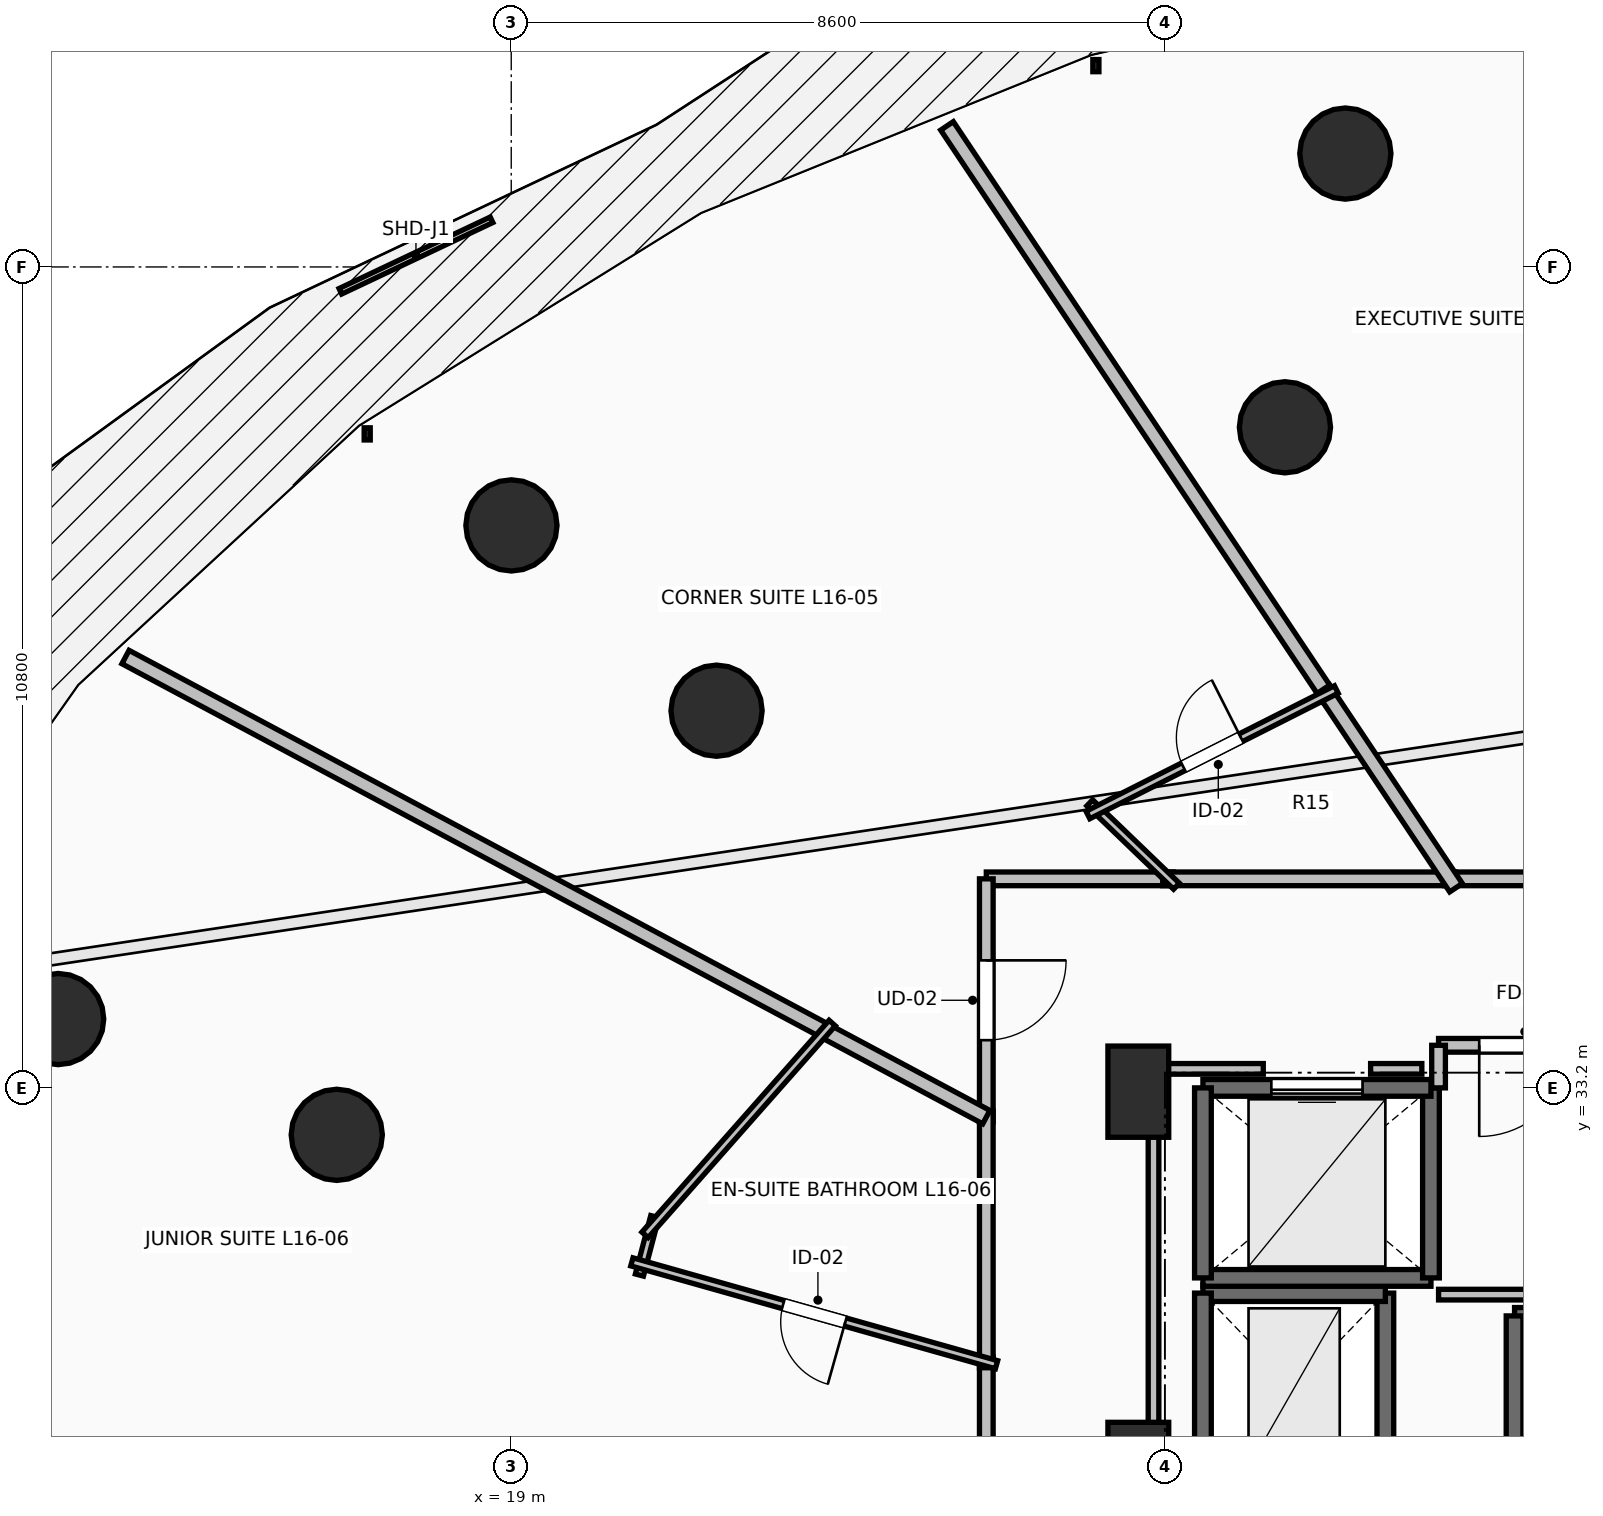
"""IFC4 building model, lengths in metres.
Left out: names, types, materials, properties, quantities, classifications, styles, units other than length and angle.
Written with IfcOpenShell. Run it as: python <this file> out.ifc"""

import sys

from ifc_helpers import new_model, si_unit, direction, frame, frame_2d, origin, origin_2d, place, context, subcontext, project, spatial, rectangle, circle, extrude, element, fill, save


model = new_model("IFC4")
c1 = context("Model", 3, precision=1e-05, world=origin(), true_north=direction((0.0, 1.0)))
c2 = subcontext(c1, "Body", "Model", "MODEL_VIEW")
j1 = project(units=[si_unit("LENGTHUNIT", "METRE"), si_unit("PLANEANGLEUNIT", "RADIAN")], contexts=[c1])
p1 = place(None, origin())
s1 = spatial("IfcSite", under=j1, at=p1, CompositionType="ELEMENT")
p2 = place(p1, origin())
s2 = spatial("IfcBuilding", under=s1, at=p2, CompositionType="ELEMENT")
p3 = place(p2, frame((0.0, 0.0, 62.5)))
s3 = spatial("IfcBuildingStorey", under=s2, at=p3, CompositionType="ELEMENT", Elevation=62.5)
for number, where, z_axis, x_axis in (
    (1, (29.179, 41.891, 0.0), (0.0, 0.0, 1.0), (-0.383, 0.924, 0.0)),
    (2, (21.701, 38.162, 0.0), (0.0, 0.0, 1.0), (-0.707, 0.707, 0.0)),
    (3, (16.705, 32.582, 0.0), (0.0, 0.0, 1.0), (-0.924, 0.383, 0.0)),
    (4, (29.974, 45.492, 0.0), (0.0, 0.0, 1.0), (-0.383, 0.924, 0.0)),
    (5, (19.003, 40.6, 0.0), (0.0, 0.0, 1.0), (-0.707, 0.707, 0.0)),
    (6, (13.039, 34.105, 0.0), (0.0, 0.0, 1.0), (-0.924, 0.383, 0.0)),
):
    element("IfcColumn", number, at=place(p3, frame(where, z_axis=z_axis, x_axis=x_axis)), inside=s3, PredefinedType="COLUMN", context=c2, shape_type="SweptSolid", body=[
        extrude(circle(Radius=0.6, at=origin_2d()), origin(), (0.0, 0.0, 1.0), 3.5),
    ])
for number, where, z_axis, x_axis in (
    (7, (27.25, 28.2, 0.0), (0.0, 0.0, 1.0), (1.0, 0.0, 0.0)),
    (8, (27.25, 33.15, 0.0), (0.0, 0.0, 1.0), (1.0, 0.0, 0.0)),
):
    element("IfcColumn", number, at=place(p3, frame(where, z_axis=z_axis, x_axis=x_axis)), inside=s3, PredefinedType="PILASTER", context=c2, shape_type="SweptSolid", body=[
        extrude(rectangle(XDim=0.8, YDim=1.2, at=origin_2d()), origin(), (0.0, 0.0, 1.0), 3.5),
    ])
p4 = place(p3, frame((34.2, 30.2, 0.0), z_axis=(0.0, 0.0, 1.0), x_axis=(-1.0, 0.0, 0.0)))
e9 = element("IfcWall", 9, at=p4, inside=s3, PredefinedType="SOLIDWALL", context=c2, shape_type="SweptSolid", body=[
    extrude(rectangle(XDim=2.0, YDim=0.22, at=frame_2d((1.0, 0.0))), origin(), (0.0, 0.0, 1.0), 3.24),
])
p5 = place(p3, frame((32.2, 30.2, 0.0), z_axis=(0.0, 0.0, 1.0), x_axis=(0.0, -1.0, 0.0)))
e10 = element("IfcWall", 10, at=p5, inside=s3, PredefinedType="SOLIDWALL", context=c2, shape_type="SweptSolid", body=[
    extrude(rectangle(XDim=2.4, YDim=0.22, at=frame_2d((1.2, 0.0))), origin(), (0.0, 0.0, 1.0), 3.24),
])
p6 = place(p3, frame((30.5, 28.0, 0.0), z_axis=(0.0, 0.0, 1.0), x_axis=(0.0, 1.0, 0.0)))
e11 = element("IfcWall", 11, at=p6, inside=s3, PredefinedType="SHEAR", context=c2, shape_type="SweptSolid", body=[
    extrude(rectangle(XDim=2.5, YDim=0.22, at=frame_2d((1.25, 0.0))), origin(), (0.0, 0.0, 1.0), 3.24),
])
p7 = place(p3, frame((30.5, 30.5, 0.0), z_axis=(0.0, 0.0, 1.0), x_axis=(-1.0, 0.0, 0.0)))
e12 = element("IfcWall", 12, at=p7, inside=s3, PredefinedType="SHEAR", context=c2, shape_type="SweptSolid", body=[
    extrude(rectangle(XDim=2.4, YDim=0.22, at=frame_2d((1.2, 0.0))), origin(), (0.0, 0.0, 1.0), 3.24),
])
p8 = place(p3, frame((28.1, 30.5, 0.0), z_axis=(0.0, 0.0, 1.0), x_axis=(0.0, -1.0, 0.0)))
e13 = element("IfcWall", 13, at=p8, inside=s3, PredefinedType="SHEAR", context=c2, shape_type="SweptSolid", body=[
    extrude(rectangle(XDim=2.5, YDim=0.22, at=frame_2d((1.25, 0.0))), origin(), (0.0, 0.0, 1.0), 3.24),
])
p9 = place(p3, frame((28.1, 30.7, 0.0), z_axis=(0.0, 0.0, 1.0), x_axis=(1.0, 0.0, 0.0)))
e14 = element("IfcWall", 14, at=p9, inside=s3, PredefinedType="SOLIDWALL", context=c2, shape_type="SweptSolid", body=[
    extrude(rectangle(XDim=3.0, YDim=0.22, at=frame_2d((1.5, 0.0))), origin(), (0.0, 0.0, 1.0), 3.24),
])
p10 = place(p3, frame((31.1, 30.7, 0.0), z_axis=(0.0, 0.0, 1.0), x_axis=(0.0, 1.0, 0.0)))
e15 = element("IfcWall", 15, at=p10, inside=s3, PredefinedType="SOLIDWALL", context=c2, shape_type="SweptSolid", body=[
    extrude(rectangle(XDim=2.5, YDim=0.22, at=frame_2d((1.25, 0.0))), origin(), (0.0, 0.0, 1.0), 3.24),
])
p11 = place(p3, frame((31.1, 33.2, 0.0), z_axis=(0.0, 0.0, 1.0), x_axis=(-1.0, 0.0, 0.0)))
e16 = element("IfcWall", 16, at=p11, inside=s3, PredefinedType="SOLIDWALL", context=c2, shape_type="SweptSolid", body=[
    extrude(rectangle(XDim=3.0, YDim=0.22, at=frame_2d((1.5, 0.0))), origin(), (0.0, 0.0, 1.0), 3.24),
])
p12 = place(p11, frame((0.9, 0.0, 0.0)))
e17 = element("IfcOpeningElement", 17, at=p12, cuts=e16, PredefinedType="OPENING", context=c2, shape_type="SweptSolid", body=[
    extrude(rectangle(XDim=1.2, YDim=2.2, at=frame_2d((0.6, 1.1))), frame((0.0, 0.125, 0.0), z_axis=(0.0, -1.0, 0.0), x_axis=(1.0, 0.0, 0.0)), (0.0, 0.0, 1.0), 0.25),
])
p13 = place(p3, frame((28.1, 33.2, 0.0), z_axis=(0.0, 0.0, 1.0), x_axis=(0.0, -1.0, 0.0)))
e18 = element("IfcWall", 18, at=p13, inside=s3, PredefinedType="SOLIDWALL", context=c2, shape_type="SweptSolid", body=[
    extrude(rectangle(XDim=2.5, YDim=0.22, at=frame_2d((1.25, 0.0))), origin(), (0.0, 0.0, 1.0), 3.24),
])
p14 = place(p3, frame((33.47, 33.76, 0.0), z_axis=(0.0, 0.0, 1.0), x_axis=(-1.0, 0.0, 0.0)))
e19 = element("IfcWall", 19, at=p14, inside=s3, PredefinedType="PARTITIONING", context=c2, shape_type="SweptSolid", body=[
    extrude(rectangle(XDim=2.27, YDim=0.18, at=frame_2d((1.135, 0.0))), origin(), (0.0, 0.0, 1.0), 3.24),
])
p15 = place(p14, frame((0.535, 0.0, 0.0)))
e20 = element("IfcOpeningElement", 20, at=p15, cuts=e19, PredefinedType="OPENING", context=c2, shape_type="SweptSolid", body=[
    extrude(rectangle(XDim=1.2, YDim=2.15, at=frame_2d((0.6, 1.075))), frame((0.0, 0.105, 0.0), z_axis=(0.0, -1.0, 0.0), x_axis=(1.0, 0.0, 0.0)), (0.0, 0.0, 1.0), 0.21),
])
p16 = place(p3, frame((31.2, 33.76, 0.0), z_axis=(0.0, 0.0, 1.0), x_axis=(0.0, -1.0, 0.0)))
e21 = element("IfcWall", 21, at=p16, inside=s3, PredefinedType="PARTITIONING", context=c2, shape_type="SweptSolid", body=[
    extrude(rectangle(XDim=0.56, YDim=0.18, at=frame_2d((0.28, 0.0))), origin(), (0.0, 0.0, 1.0), 3.24),
])
p17 = place(p3, frame((34.827, 35.95, 0.0), z_axis=(0.0, 0.0, 1.0), x_axis=(-1.0, 0.0, 0.0)))
e22 = element("IfcWall", 22, at=p17, inside=s3, PredefinedType="PARTITIONING", context=c2, shape_type="SweptSolid", body=[
    extrude(rectangle(XDim=3.547, YDim=0.18, at=frame_2d((1.773, 0.0))), origin(), (0.0, 0.0, 1.0), 3.24),
])
p18 = place(p17, frame((1.249, 0.0, 0.0)))
e23 = element("IfcOpeningElement", 23, at=p18, cuts=e22, PredefinedType="OPENING", context=c2, shape_type="SweptSolid", body=[
    extrude(rectangle(XDim=1.05, YDim=2.2, at=frame_2d((0.525, 1.1))), frame((0.0, 0.105, 0.0), z_axis=(0.0, -1.0, 0.0), x_axis=(1.0, 0.0, 0.0)), (0.0, 0.0, 1.0), 0.21),
])
p19 = place(p3, frame((27.711, 35.95, 0.0), z_axis=(0.0, 0.0, 1.0), x_axis=(-1.0, 0.0, 0.0)))
e24 = element("IfcWall", 24, at=p19, inside=s3, PredefinedType="PARTITIONING", context=c2, shape_type="SweptSolid", body=[
    extrude(rectangle(XDim=2.461, YDim=0.18, at=frame_2d((1.23, 0.0))), origin(), (0.0, 0.0, 1.0), 2.432),
])
p20 = place(p3, frame((25.25, 35.95, 0.0), z_axis=(0.0, 0.0, 1.0), x_axis=(0.0, -1.0, 0.0)))
e25 = element("IfcWall", 25, at=p20, inside=s3, PredefinedType="PARTITIONING", context=c2, shape_type="SweptSolid", body=[
    extrude(rectangle(XDim=3.195, YDim=0.18, at=frame_2d((1.598, 0.0))), origin(), (0.0, 0.0, 1.0), 2.432),
])
p21 = place(p20, frame((1.073, 0.0, 0.0)))
e26 = element("IfcOpeningElement", 26, at=p21, cuts=e25, PredefinedType="OPENING", context=c2, shape_type="SweptSolid", body=[
    extrude(rectangle(XDim=1.05, YDim=2.2, at=frame_2d((0.525, 1.1))), frame((0.0, 0.105, 0.0), z_axis=(0.0, -1.0, 0.0), x_axis=(1.0, 0.0, 0.0)), (0.0, 0.0, 1.0), 0.21),
])
p22 = place(p3, frame((31.42, 35.95, 0.0), z_axis=(0.0, 0.0, 1.0), x_axis=(-1.0, 0.0, 0.0)))
e27 = element("IfcWall", 27, at=p22, inside=s3, PredefinedType="PARTITIONING", context=c2, shape_type="SweptSolid", body=[
    extrude(rectangle(XDim=3.849, YDim=0.18, at=frame_2d((1.924, 0.0))), origin(), (0.0, 0.0, 1.0), 2.432),
])
p23 = place(p3, frame((25.25, 29.658, 0.0), z_axis=(0.0, 0.0, 1.0), x_axis=(0.0, -1.0, 0.0)))
e28 = element("IfcWall", 28, at=p23, inside=s3, PredefinedType="PARTITIONING", context=c2, shape_type="SweptSolid", body=[
    extrude(rectangle(XDim=3.718, YDim=0.18, at=frame_2d((1.859, 0.0))), origin(), (0.0, 0.0, 1.0), 2.432),
])
p24 = place(p23, frame((1.334, 0.0, 0.0)))
e29 = element("IfcOpeningElement", 29, at=p24, cuts=e28, PredefinedType="OPENING", context=c2, shape_type="SweptSolid", body=[
    extrude(rectangle(XDim=1.05, YDim=2.2, at=frame_2d((0.525, 1.1))), frame((0.0, 0.105, 0.0), z_axis=(0.0, -1.0, 0.0), x_axis=(1.0, 0.0, 0.0)), (0.0, 0.0, 1.0), 0.21),
])
p25 = place(p3, frame((25.25, 32.895, 0.0), z_axis=(0.0, 0.0, 1.0), x_axis=(0.0, -1.0, 0.0)))
e30 = element("IfcWall", 30, at=p25, inside=s3, PredefinedType="PARTITIONING", context=c2, shape_type="SweptSolid", body=[
    extrude(rectangle(XDim=3.377, YDim=0.18, at=frame_2d((1.688, 0.0))), origin(), (0.0, 0.0, 1.0), 3.24),
])
p26 = place(p3, frame((24.733, 45.856, 0.0), z_axis=(0.0, 0.0, 1.0), x_axis=(0.555564858458, -0.831473203444, 0.0)))
e31 = element("IfcWall", 31, at=p26, inside=s3, PredefinedType="PARTITIONING", context=c2, shape_type="SweptSolid", body=[
    extrude(rectangle(XDim=9.054, YDim=0.2, at=frame_2d((4.527, 0.0))), origin(), (0.0, 0.0, 1.0), 2.432),
])
p27 = place(p3, frame((29.685, 38.444, 0.0), z_axis=(0.0, 0.0, 1.0), x_axis=(0.555596981897, -0.831451738652, 0.0)))
e32 = element("IfcWall", 32, at=p27, inside=s3, PredefinedType="PARTITIONING", context=c2, shape_type="SweptSolid", body=[
    extrude(rectangle(XDim=3.14, YDim=0.2, at=frame_2d((1.57, 0.0))), origin(), (0.0, 0.0, 1.0), 2.432),
])
p28 = place(p3, frame((27.752, 35.853, 0.0), z_axis=(0.0, 0.0, 1.0), x_axis=(-0.720853814296, 0.693087136236, 0.0)))
e33 = element("IfcWall", 33, at=p28, inside=s3, PredefinedType="PARTITIONING", context=c2, shape_type="SweptSolid", body=[
    extrude(rectangle(XDim=1.583, YDim=0.11, at=frame_2d((0.792, 0.0))), origin(), (0.0, 0.0, 1.0), 2.432),
])
p29 = place(p3, frame((26.587, 36.79, 0.0), z_axis=(0.0, 0.0, 1.0), x_axis=(0.892525573298, 0.450996786029, 0.0)))
e34 = element("IfcWall", 34, at=p29, inside=s3, PredefinedType="PARTITIONING", context=c2, shape_type="SweptSolid", body=[
    extrude(rectangle(XDim=3.662, YDim=0.11, at=frame_2d((1.831, 0.0))), origin(), (0.0, 0.0, 1.0), 2.432),
])
p30 = place(p29, frame((1.406, 0.0, 0.0)))
e35 = element("IfcOpeningElement", 35, at=p30, cuts=e34, PredefinedType="OPENING", context=c2, shape_type="SweptSolid", body=[
    extrude(rectangle(XDim=0.85, YDim=2.1, at=frame_2d((0.425, 1.05))), frame((0.0, 0.07, 0.0), z_axis=(0.0, -1.0, 0.0), x_axis=(1.0, 0.0, 0.0)), (0.0, 0.0, 1.0), 0.14),
])
p31 = place(p3, frame((13.925, 38.868, 0.0), z_axis=(0.0, 0.0, 1.0), x_axis=(0.881932077496, -0.471376506292, 0.0)))
e36 = element("IfcWall", 36, at=p31, inside=s3, PredefinedType="PARTITIONING", context=c2, shape_type="SweptSolid", body=[
    extrude(rectangle(XDim=12.841, YDim=0.2, at=frame_2d((6.42, 0.0))), origin(), (0.0, 0.0, 1.0), 2.624),
])
p32 = place(p3, frame((20.686, 30.738, 0.0), z_axis=(0.0, 0.0, 1.0), x_axis=(0.254583995409, 0.967050665313, 0.0)))
e37 = element("IfcWall", 37, at=p32, inside=s3, PredefinedType="PARTITIONING", context=c2, shape_type="SweptSolid", body=[
    extrude(rectangle(XDim=0.795, YDim=0.11, at=frame_2d((0.397, 0.0))), origin(), (0.0, 0.0, 1.0), 2.432),
])
p33 = place(p3, frame((20.76, 31.266, 0.0), z_axis=(0.0, 0.0, 1.0), x_axis=(0.662136072578, 0.74938362765, 0.0)))
e38 = element("IfcWall", 38, at=p33, inside=s3, PredefinedType="PARTITIONING", context=c2, shape_type="SweptSolid", body=[
    extrude(rectangle(XDim=3.719, YDim=0.11, at=frame_2d((1.859, 0.0))), origin(), (0.0, 0.0, 1.0), 3.24),
])
p34 = place(p3, frame((25.385, 29.558, 0.0), z_axis=(0.0, 0.0, 1.0), x_axis=(-0.962466408657, 0.271400833098, 0.0)))
e39 = element("IfcWall", 39, at=p34, inside=s3, PredefinedType="PARTITIONING", context=c2, shape_type="SweptSolid", body=[
    extrude(rectangle(XDim=4.984, YDim=0.11, at=frame_2d((2.492, 0.0))), origin(), (0.0, 0.0, 1.0), 2.432),
])
p35 = place(p34, frame((2.067, 0.0, 0.0)))
e40 = element("IfcOpeningElement", 40, at=p35, cuts=e39, PredefinedType="OPENING", context=c2, shape_type="SweptSolid", body=[
    extrude(rectangle(XDim=0.85, YDim=2.1, at=frame_2d((0.425, 1.05))), frame((0.0, 0.07, 0.0), z_axis=(0.0, -1.0, 0.0), x_axis=(1.0, 0.0, 0.0)), (0.0, 0.0, 1.0), 0.14),
])
p36 = place(p3, frame((31.2, 30.48, 0.0), z_axis=(0.0, 0.0, 1.0), x_axis=(1.0, 0.0, 0.0)))
e41 = element("IfcWall", 41, at=p36, inside=s3, PredefinedType="PARTITIONING", context=c2, shape_type="SweptSolid", body=[
    extrude(rectangle(XDim=2.05, YDim=0.14, at=frame_2d((1.025, 0.0))), origin(), (0.0, 0.0, 1.0), 3.24),
])
p37 = place(p3, frame((27.45, 28.196, 0.0), z_axis=(0.0, 0.0, 1.0), x_axis=(0.0, 1.0, 0.0)))
e42 = element("IfcWall", 42, at=p37, inside=s3, PredefinedType="PARTITIONING", context=c2, shape_type="SweptSolid", body=[
    extrude(rectangle(XDim=5.254, YDim=0.14, at=frame_2d((2.627, 0.0))), origin(), (0.0, 0.0, 1.0), 2.432),
])
p38 = place(p3, frame((27.45, 33.45, 0.0), z_axis=(0.0, 0.0, 1.0), x_axis=(1.0, 0.0, 0.0)))
e43 = element("IfcWall", 43, at=p38, inside=s3, PredefinedType="PARTITIONING", context=c2, shape_type="SweptSolid", body=[
    extrude(rectangle(XDim=1.444, YDim=0.14, at=frame_2d((0.722, 0.0))), origin(), (0.0, 0.0, 1.0), 2.432),
])
p39 = place(p3, frame((30.306, 33.45, 0.0), z_axis=(0.0, 0.0, 1.0), x_axis=(1.0, 0.0, 0.0)))
e44 = element("IfcWall", 44, at=p39, inside=s3, PredefinedType="PARTITIONING", context=c2, shape_type="SweptSolid", body=[
    extrude(rectangle(XDim=0.674, YDim=0.14, at=frame_2d((0.337, 0.0))), origin(), (0.0, 0.0, 1.0), 3.24),
])
p40 = place(p12, origin())
e45 = element("IfcDoor", 45, at=p40, inside=s3, OperationType="SLIDING_TO_LEFT", PredefinedType="DOOR", context=c2, shape_type="SweptSolid", body=[
    extrude(rectangle(XDim=1.2, YDim=2.2, at=frame_2d((0.6, 1.1))), frame((0.0, 0.025, 0.0), z_axis=(0.0, -1.0, 0.0), x_axis=(1.0, 0.0, 0.0)), (0.0, 0.0, 1.0), 0.05),
])
fill(e17, e45)
p41 = place(p15, origin())
e46 = element("IfcDoor", 46, at=p41, inside=s3, OperationType="SINGLE_SWING_RIGHT", PredefinedType="DOOR", context=c2, shape_type="SweptSolid", body=[
    extrude(rectangle(XDim=1.2, YDim=2.15, at=frame_2d((0.6, 1.075))), frame((0.0, 0.025, 0.0), z_axis=(0.0, -1.0, 0.0), x_axis=(1.0, 0.0, 0.0)), (0.0, 0.0, 1.0), 0.05),
])
fill(e20, e46)
p42 = place(p21, origin())
e47 = element("IfcDoor", 47, at=p42, inside=s3, OperationType="SINGLE_SWING_LEFT", PredefinedType="DOOR", context=c2, shape_type="SweptSolid", body=[
    extrude(rectangle(XDim=1.05, YDim=2.2, at=frame_2d((0.525, 1.1))), frame((0.0, 0.025, 0.0), z_axis=(0.0, -1.0, 0.0), x_axis=(1.0, 0.0, 0.0)), (0.0, 0.0, 1.0), 0.05),
])
fill(e26, e47)
p43 = place(p30, origin())
e48 = element("IfcDoor", 48, at=p43, inside=s3, OperationType="SINGLE_SWING_RIGHT", PredefinedType="DOOR", context=c2, shape_type="SweptSolid", body=[
    extrude(rectangle(XDim=0.85, YDim=2.1, at=frame_2d((0.425, 1.05))), frame((0.0, 0.025, 0.0), z_axis=(0.0, -1.0, 0.0), x_axis=(1.0, 0.0, 0.0)), (0.0, 0.0, 1.0), 0.05),
])
fill(e35, e48)
p44 = place(p35, origin())
e49 = element("IfcDoor", 49, at=p44, inside=s3, OperationType="SINGLE_SWING_LEFT", PredefinedType="DOOR", context=c2, shape_type="SweptSolid", body=[
    extrude(rectangle(XDim=0.85, YDim=2.1, at=frame_2d((0.425, 1.05))), frame((0.0, 0.025, 0.0), z_axis=(0.0, -1.0, 0.0), x_axis=(1.0, 0.0, 0.0)), (0.0, 0.0, 1.0), 0.05),
])
fill(e40, e49)
save(model, sys.argv[1])
